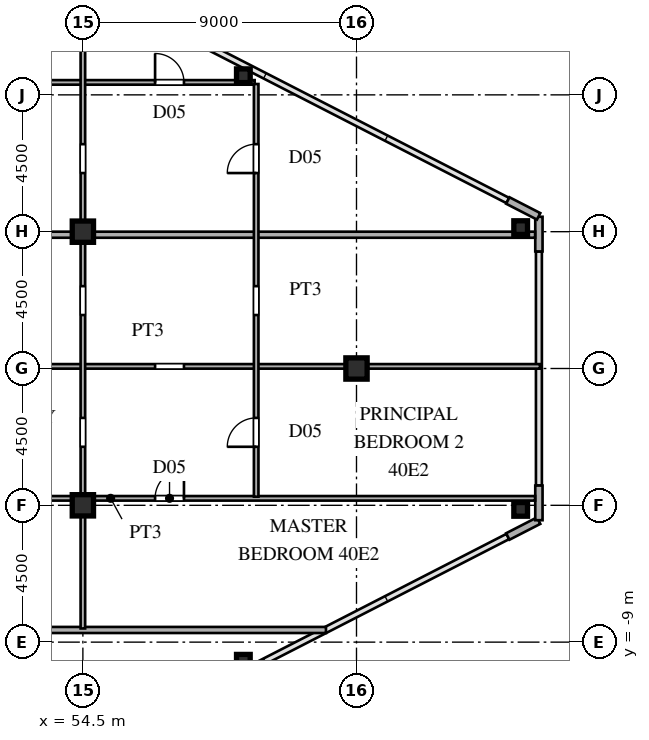
"""IFC4 building model, lengths in metres.
Left out: names, types, materials, properties, quantities, classifications, styles, units other than length and angle.
Written with IfcOpenShell. Run it as: python <this file> out.ifc"""

import sys

from ifc_helpers import new_model, si_unit, direction, frame, frame_2d, origin, origin_2d, place, context, subcontext, project, spatial, rectangle, hollow_rectangle, i_section, extrude, source, transform, mapped, element, fill, save


model = new_model("IFC4")
c1 = context("Model", 3, precision=1e-05, world=origin(), true_north=direction((0.0, 1.0)))
c2 = subcontext(c1, "Body", "Model", "MODEL_VIEW")
j1 = project(units=[si_unit("LENGTHUNIT", "METRE"), si_unit("PLANEANGLEUNIT", "RADIAN")], contexts=[c1])
p1 = place(None, origin())
s1 = spatial("IfcSite", under=j1, at=p1, CompositionType="ELEMENT")
p2 = place(p1, origin())
s2 = spatial("IfcBuilding", under=s1, at=p2, CompositionType="ELEMENT")
p3 = place(p2, frame((0.0, 0.0, 151.2)))
s3 = spatial("IfcBuildingStorey", under=s2, at=p3, CompositionType="ELEMENT", Elevation=151.2)
m1 = source(origin(), c2, "Body", "SweptSolid", [
    extrude(i_section(OverallWidth=0.7, OverallDepth=0.7, WebThickness=0.028, FlangeThickness=0.045, at=origin_2d()), origin(), (0.0, 0.0, 1.0), 3.6),
])
for number, where, z_axis, x_axis in (
    (1, (54.5, -4.5, 0.0), (0.0, 0.0, 1.0), (1.0, 0.0, 0.0)),
    (2, (54.5, 4.5, 0.0), (0.0, 0.0, 1.0), (1.0, 0.0, 0.0)),
    (3, (63.5, 0.0, 0.0), (0.0, 0.0, 1.0), (1.0, 0.0, 0.0)),
):
    element("IfcColumn", number, at=place(p3, frame(where, z_axis=z_axis, x_axis=x_axis)), inside=s3, PredefinedType="COLUMN", context=c2, shape_type="MappedRepresentation", body=[
        mapped(m1, transform((0.0, 0.0, 0.0), scale=1.0)),
    ])
m2 = source(origin(), c2, "Body", "SweptSolid", [
    extrude(hollow_rectangle(XDim=0.45, YDim=0.45, WallThickness=0.018, at=origin_2d()), origin(), (0.0, 0.0, 1.0), 3.6),
])
for number, where, z_axis, x_axis in (
    (4, (68.9, -4.634, 0.0), (0.0, 0.0, 1.0), (1.0, 0.0, 0.0)),
    (5, (68.9, 4.634, 0.0), (0.0, 0.0, 1.0), (1.0, 0.0, 0.0)),
    (6, (59.779, -9.629, 0.0), (0.0, 0.0, 1.0), (1.0, 0.0, 0.0)),
    (7, (59.779, 9.629, 0.0), (0.0, 0.0, 1.0), (1.0, 0.0, 0.0)),
):
    element("IfcColumn", number, at=place(p3, frame(where, z_axis=z_axis, x_axis=x_axis)), inside=s3, PredefinedType="COLUMN", context=c2, shape_type="MappedRepresentation", body=[
        mapped(m2, transform((0.0, 0.0, 0.0), scale=1.0)),
    ])
p4 = place(p3, frame((68.477, -5.525, 0.0), z_axis=(0.0, 0.0, 1.0), x_axis=(0.889797395748, 0.456355776255, 0.0)))
e8 = element("IfcWall", 8, at=p4, inside=s3, PredefinedType="SOLIDWALL", context=c2, shape_type="SweptSolid", body=[
    extrude(rectangle(XDim=1.14, YDim=0.24, at=frame_2d((0.57, 0.0))), origin(), (0.0, 0.0, 1.0), 3.38),
])
for number, where, z_axis, x_axis in (
    (9, (69.5, -4.99, 0.0), (0.0, 0.0, 1.0), (0.0, 1.0, 0.0)),
    (10, (69.5, 3.85, 0.0), (0.0, 0.0, 1.0), (0.0, 1.0, 0.0)),
):
    element("IfcWall", number, at=place(p3, frame(where, z_axis=z_axis, x_axis=x_axis)), inside=s3, PredefinedType="SOLIDWALL", context=c2, shape_type="SweptSolid", body=[
        extrude(rectangle(XDim=1.14, YDim=0.24, at=frame_2d((0.57, 0.0))), origin(), (0.0, 0.0, 1.0), 3.38),
    ])
p5 = place(p3, frame((69.491, 5.005, 0.0), z_axis=(0.0, 0.0, 1.0), x_axis=(-0.889797395748, 0.456355776255, 0.0)))
e11 = element("IfcWall", 11, at=p5, inside=s3, PredefinedType="SOLIDWALL", context=c2, shape_type="SweptSolid", body=[
    extrude(rectangle(XDim=1.14, YDim=0.24, at=frame_2d((0.57, 0.0))), origin(), (0.0, 0.0, 1.0), 3.38),
])
p6 = place(p3, frame((38.43, -8.6, 0.0), z_axis=(0.0, 0.0, 1.0), x_axis=(1.0, 0.0, 0.0)))
e12 = element("IfcWall", 12, at=p6, inside=s3, PredefinedType="PARTITIONING", context=c2, shape_type="SweptSolid", body=[
    extrude(rectangle(XDim=24.066, YDim=0.2, at=frame_2d((12.033, 0.0))), origin(), (0.0, 0.0, 1.0), 3.38),
])
p7 = place(p3, frame((41.45, -4.27, 0.0), z_axis=(0.0, 0.0, 1.0), x_axis=(1.0, 0.0, 0.0)))
e13 = element("IfcWall", 13, at=p7, inside=s3, PredefinedType="PARTITIONING", context=c2, shape_type="SweptSolid", body=[
    extrude(rectangle(XDim=27.925, YDim=0.15, at=frame_2d((13.962, 0.0))), origin(), (0.0, 0.0, 1.0), 3.38),
])
p8 = place(p7, frame((2.676, 0.0, 0.0)))
e14 = element("IfcOpeningElement", 14, at=p8, cuts=e13, PredefinedType="OPENING", context=c2, shape_type="SweptSolid", body=[
    extrude(rectangle(XDim=0.95, YDim=2.15, at=frame_2d((0.475, 1.075))), frame((0.0, 0.085, 0.0), z_axis=(0.0, -1.0, 0.0), x_axis=(1.0, 0.0, 0.0)), (0.0, 0.0, 1.0), 0.17),
])
p9 = place(p7, frame((15.425, 0.0, 0.0)))
e15 = element("IfcOpeningElement", 15, at=p9, cuts=e13, PredefinedType="OPENING", context=c2, shape_type="SweptSolid", body=[
    extrude(rectangle(XDim=0.95, YDim=2.15, at=frame_2d((0.475, 1.075))), frame((0.0, 0.085, 0.0), z_axis=(0.0, -1.0, 0.0), x_axis=(1.0, 0.0, 0.0)), (0.0, 0.0, 1.0), 0.17),
])
p10 = place(p3, frame((41.45, 0.07, 0.0), z_axis=(0.0, 0.0, 1.0), x_axis=(1.0, 0.0, 0.0)))
e16 = element("IfcWall", 16, at=p10, inside=s3, PredefinedType="PARTITIONING", context=c2, shape_type="SweptSolid", body=[
    extrude(rectangle(XDim=28.085, YDim=0.15, at=frame_2d((14.042, 0.0))), origin(), (0.0, 0.0, 1.0), 3.38),
])
p11 = place(p10, frame((2.75, 0.0, 0.0)))
e17 = element("IfcOpeningElement", 17, at=p11, cuts=e16, PredefinedType="OPENING", context=c2, shape_type="SweptSolid", body=[
    extrude(rectangle(XDim=0.95, YDim=2.15, at=frame_2d((0.475, 1.075))), frame((0.0, 0.085, 0.0), z_axis=(0.0, -1.0, 0.0), x_axis=(1.0, 0.0, 0.0)), (0.0, 0.0, 1.0), 0.17),
])
p12 = place(p10, frame((15.425, 0.0, 0.0)))
e18 = element("IfcOpeningElement", 18, at=p12, cuts=e16, PredefinedType="OPENING", context=c2, shape_type="SweptSolid", body=[
    extrude(rectangle(XDim=0.95, YDim=2.15, at=frame_2d((0.475, 1.075))), frame((0.0, 0.085, 0.0), z_axis=(0.0, -1.0, 0.0), x_axis=(1.0, 0.0, 0.0)), (0.0, 0.0, 1.0), 0.17),
])
p13 = place(p3, frame((38.43, 4.4, 0.0), z_axis=(0.0, 0.0, 1.0), x_axis=(1.0, 0.0, 0.0)))
e19 = element("IfcWall", 19, at=p13, inside=s3, PredefinedType="PARTITIONING", context=c2, shape_type="SweptSolid", body=[
    extrude(rectangle(XDim=16.09, YDim=0.2, at=frame_2d((8.045, 0.0))), origin(), (0.0, 0.0, 1.0), 2.78),
])
p14 = place(p3, frame((54.52, 4.4, 0.0), z_axis=(0.0, 0.0, 1.0), x_axis=(1.0, 0.0, 0.0)))
e20 = element("IfcWall", 20, at=p14, inside=s3, PredefinedType="PARTITIONING", context=c2, shape_type="SweptSolid", body=[
    extrude(rectangle(XDim=14.855, YDim=0.2, at=frame_2d((7.427, 0.0))), origin(), (0.0, 0.0, 1.0), 3.38),
])
p15 = place(p3, frame((41.45, 9.41, 0.0), z_axis=(0.0, 0.0, 1.0), x_axis=(1.0, 0.0, 0.0)))
e21 = element("IfcWall", 21, at=p15, inside=s3, PredefinedType="PARTITIONING", context=c2, shape_type="SweptSolid", body=[
    extrude(rectangle(XDim=18.7, YDim=0.15, at=frame_2d((9.35, 0.0))), origin(), (0.0, 0.0, 1.0), 3.38),
])
p16 = place(p15, frame((2.75, 0.0, 0.0)))
e22 = element("IfcOpeningElement", 22, at=p16, cuts=e21, PredefinedType="OPENING", context=c2, shape_type="SweptSolid", body=[
    extrude(rectangle(XDim=0.95, YDim=2.15, at=frame_2d((0.475, 1.075))), frame((0.0, 0.085, 0.0), z_axis=(0.0, -1.0, 0.0), x_axis=(1.0, 0.0, 0.0)), (0.0, 0.0, 1.0), 0.17),
])
p17 = place(p15, frame((15.425, 0.0, 0.0)))
e23 = element("IfcOpeningElement", 23, at=p17, cuts=e21, PredefinedType="OPENING", context=c2, shape_type="SweptSolid", body=[
    extrude(rectangle(XDim=0.95, YDim=2.15, at=frame_2d((0.475, 1.075))), frame((0.0, 0.085, 0.0), z_axis=(0.0, -1.0, 0.0), x_axis=(1.0, 0.0, 0.0)), (0.0, 0.0, 1.0), 0.17),
])
p18 = place(p15, frame((9.3, 0.0, 0.0)))
e24 = element("IfcOpeningElement", 24, at=p18, cuts=e21, PredefinedType="OPENING", context=c2, shape_type="SweptSolid", body=[
    extrude(rectangle(XDim=0.95, YDim=2.15, at=frame_2d((0.475, 1.075))), frame((0.0, 0.085, 0.0), z_axis=(0.0, -1.0, 0.0), x_axis=(1.0, 0.0, 0.0)), (0.0, 0.0, 1.0), 0.17),
])
p19 = place(p3, frame((54.5, -8.55, 0.0), z_axis=(0.0, 0.0, 1.0), x_axis=(0.0, 1.0, 0.0)))
e25 = element("IfcWall", 25, at=p19, inside=s3, PredefinedType="PARTITIONING", context=c2, shape_type="SweptSolid", body=[
    extrude(rectangle(XDim=21.282, YDim=0.15, at=frame_2d((10.641, 0.0))), origin(), (0.0, 0.0, 1.0), 2.78),
])
p20 = place(p19, frame((5.975, 0.0, 0.0)))
e26 = element("IfcOpeningElement", 26, at=p20, cuts=e25, PredefinedType="OPENING", context=c2, shape_type="SweptSolid", body=[
    extrude(rectangle(XDim=0.95, YDim=2.15, at=frame_2d((0.475, 1.075))), frame((0.0, 0.085, 0.0), z_axis=(0.0, -1.0, 0.0), x_axis=(1.0, 0.0, 0.0)), (0.0, 0.0, 1.0), 0.17),
])
p21 = place(p19, frame((10.308, 0.0, 0.0)))
e27 = element("IfcOpeningElement", 27, at=p21, cuts=e25, PredefinedType="OPENING", context=c2, shape_type="SweptSolid", body=[
    extrude(rectangle(XDim=0.95, YDim=2.15, at=frame_2d((0.475, 1.075))), frame((0.0, 0.085, 0.0), z_axis=(0.0, -1.0, 0.0), x_axis=(1.0, 0.0, 0.0)), (0.0, 0.0, 1.0), 0.17),
])
p22 = place(p19, frame((14.978, 0.0, 0.0)))
e28 = element("IfcOpeningElement", 28, at=p22, cuts=e25, PredefinedType="OPENING", context=c2, shape_type="SweptSolid", body=[
    extrude(rectangle(XDim=0.95, YDim=2.15, at=frame_2d((0.475, 1.075))), frame((0.0, 0.085, 0.0), z_axis=(0.0, -1.0, 0.0), x_axis=(1.0, 0.0, 0.0)), (0.0, 0.0, 1.0), 0.17),
])
p23 = place(p3, frame((60.2, -4.217, 0.0), z_axis=(0.0, 0.0, 1.0), x_axis=(0.0, 1.0, 0.0)))
e29 = element("IfcWall", 29, at=p23, inside=s3, PredefinedType="PARTITIONING", context=c2, shape_type="SweptSolid", body=[
    extrude(rectangle(XDim=13.574, YDim=0.15, at=frame_2d((6.787, 0.0))), origin(), (0.0, 0.0, 1.0), 3.38),
])
p24 = place(p23, frame((1.642, 0.0, 0.0)))
e30 = element("IfcOpeningElement", 30, at=p24, cuts=e29, PredefinedType="OPENING", context=c2, shape_type="SweptSolid", body=[
    extrude(rectangle(XDim=0.95, YDim=2.15, at=frame_2d((0.475, 1.075))), frame((0.0, 0.085, 0.0), z_axis=(0.0, -1.0, 0.0), x_axis=(1.0, 0.0, 0.0)), (0.0, 0.0, 1.0), 0.17),
])
p25 = place(p23, frame((5.975, 0.0, 0.0)))
e31 = element("IfcOpeningElement", 31, at=p25, cuts=e29, PredefinedType="OPENING", context=c2, shape_type="SweptSolid", body=[
    extrude(rectangle(XDim=0.95, YDim=2.15, at=frame_2d((0.475, 1.075))), frame((0.0, 0.085, 0.0), z_axis=(0.0, -1.0, 0.0), x_axis=(1.0, 0.0, 0.0)), (0.0, 0.0, 1.0), 0.17),
])
p26 = place(p23, frame((10.645, 0.0, 0.0)))
e32 = element("IfcOpeningElement", 32, at=p26, cuts=e29, PredefinedType="OPENING", context=c2, shape_type="SweptSolid", body=[
    extrude(rectangle(XDim=0.95, YDim=2.15, at=frame_2d((0.475, 1.075))), frame((0.0, 0.085, 0.0), z_axis=(0.0, -1.0, 0.0), x_axis=(1.0, 0.0, 0.0)), (0.0, 0.0, 1.0), 0.17),
])
m3 = source(origin(), c2, "Body", "SweptSolid", [
    extrude(rectangle(XDim=0.95, YDim=2.15, at=frame_2d((0.475, 1.075))), frame((0.0, 0.025, 0.0), z_axis=(0.0, -1.0, 0.0), x_axis=(1.0, 0.0, 0.0)), (0.0, 0.0, 1.0), 0.05),
])
p27 = place(p9, origin())
e33 = element("IfcDoor", 33, at=p27, inside=s3, OperationType="SINGLE_SWING_RIGHT", PredefinedType="DOOR", context=c2, shape_type="MappedRepresentation", body=[
    mapped(m3, transform((0.0, 0.0, 0.0), scale=1.0)),
])
fill(e15, e33)
p28 = place(p17, origin())
e34 = element("IfcDoor", 34, at=p28, inside=s3, OperationType="SINGLE_SWING_LEFT", PredefinedType="DOOR", context=c2, shape_type="MappedRepresentation", body=[
    mapped(m3, transform((0.0, 0.0, 0.0), scale=1.0)),
])
fill(e23, e34)
p29 = place(p24, origin())
e35 = element("IfcDoor", 35, at=p29, inside=s3, OperationType="SINGLE_SWING_LEFT", PredefinedType="DOOR", context=c2, shape_type="MappedRepresentation", body=[
    mapped(m3, transform((0.0, 0.0, 0.0), scale=1.0)),
])
fill(e30, e35)
p30 = place(p26, origin())
e36 = element("IfcDoor", 36, at=p30, inside=s3, OperationType="SINGLE_SWING_LEFT", PredefinedType="DOOR", context=c2, shape_type="MappedRepresentation", body=[
    mapped(m3, transform((0.0, 0.0, 0.0), scale=1.0)),
])
fill(e32, e36)
save(model, sys.argv[1])
